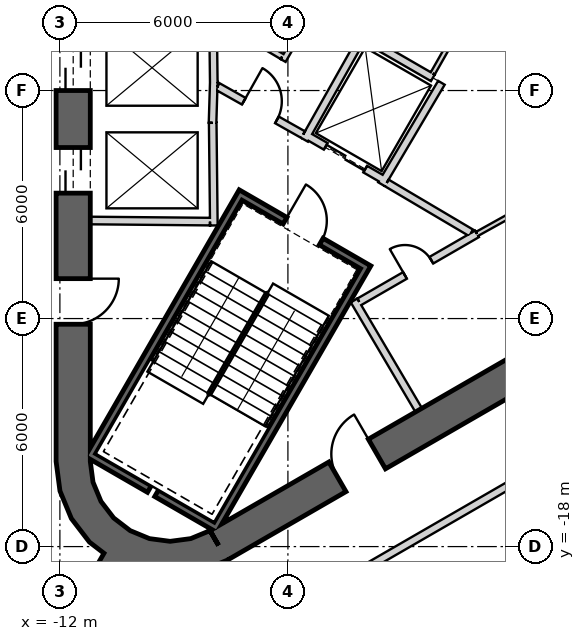
"""IFC4 building model, lengths in metres.
Left out: names, types, materials, properties, quantities, classifications, styles, units other than length and angle.
Written with IfcOpenShell. Run it as: python <this file> out.ifc"""

import sys

from ifc_helpers import new_model, si_unit, direction, frame, frame_2d, origin, place, context, subcontext, project, spatial, polyline, rectangle, outline, extrude, element, fill, save


model = new_model("IFC4")
c1 = context("Model", 3, precision=1e-05, world=origin(), true_north=direction((0.0, 1.0)))
c2 = subcontext(c1, "Body", "Model", "MODEL_VIEW")
j1 = project(units=[si_unit("LENGTHUNIT", "METRE"), si_unit("PLANEANGLEUNIT", "RADIAN")], contexts=[c1])
p1 = place(None, origin())
s1 = spatial("IfcSite", under=j1, at=p1, CompositionType="ELEMENT")
p2 = place(p1, origin())
s2 = spatial("IfcBuilding", under=s1, at=p2, CompositionType="ELEMENT")
p3 = place(p2, frame((0.0, 0.0, 380.6)))
s3 = spatial("IfcBuildingStorey", under=s2, at=p3, CompositionType="ELEMENT", Elevation=380.6)
p4 = place(p3, frame((-11.65, 15.762, 0.0), z_axis=(0.0, 0.0, 1.0), x_axis=(0.0, -1.0, 0.0)))
e1 = element("IfcWall", 1, at=p4, inside=s3, PredefinedType="SHEAR", context=c2, shape_type="SweptSolid", body=[
    extrude(rectangle(XDim=31.523, YDim=0.9, at=frame_2d((15.762, 0.0))), origin(), (0.0, 0.0, 1.0), 3.9),
])
p5 = place(p4, frame((7.062, 0.0, 0.0)))
e2 = element("IfcOpeningElement", 2, at=p5, cuts=e1, PredefinedType="OPENING", context=c2, shape_type="SweptSolid", body=[
    extrude(rectangle(XDim=1.2, YDim=2.4, at=frame_2d((0.6, 1.2))), frame((0.0, 0.46, 0.0), z_axis=(0.0, -1.0, 0.0), x_axis=(1.0, 0.0, 0.0)), (0.0, 0.0, 1.0), 0.92),
])
p6 = place(p4, frame((9.762, 0.0, 0.0)))
e3 = element("IfcOpeningElement", 3, at=p6, cuts=e1, PredefinedType="OPENING", context=c2, shape_type="SweptSolid", body=[
    extrude(rectangle(XDim=1.2, YDim=2.4, at=frame_2d((0.6, 1.2))), frame((0.0, 0.46, 0.0), z_axis=(0.0, -1.0, 0.0), x_axis=(1.0, 0.0, 0.0)), (0.0, 0.0, 1.0), 0.92),
])
p7 = place(p4, frame((12.462, 0.0, 0.0)))
e4 = element("IfcOpeningElement", 4, at=p7, cuts=e1, PredefinedType="OPENING", context=c2, shape_type="SweptSolid", body=[
    extrude(rectangle(XDim=1.2, YDim=2.4, at=frame_2d((0.6, 1.2))), frame((0.0, 0.46, 0.0), z_axis=(0.0, -1.0, 0.0), x_axis=(1.0, 0.0, 0.0)), (0.0, 0.0, 1.0), 0.92),
])
p8 = place(p4, frame((15.162, 0.0, 0.0)))
e5 = element("IfcOpeningElement", 5, at=p8, cuts=e1, PredefinedType="OPENING", context=c2, shape_type="SweptSolid", body=[
    extrude(rectangle(XDim=1.2, YDim=2.4, at=frame_2d((0.6, 1.2))), frame((0.0, 0.46, 0.0), z_axis=(0.0, -1.0, 0.0), x_axis=(1.0, 0.0, 0.0)), (0.0, 0.0, 1.0), 0.92),
])
p9 = place(p4, frame((17.862, 0.0, 0.0)))
e6 = element("IfcOpeningElement", 6, at=p9, cuts=e1, PredefinedType="OPENING", context=c2, shape_type="SweptSolid", body=[
    extrude(rectangle(XDim=1.2, YDim=2.4, at=frame_2d((0.6, 1.2))), frame((0.0, 0.46, 0.0), z_axis=(0.0, -1.0, 0.0), x_axis=(1.0, 0.0, 0.0)), (0.0, 0.0, 1.0), 0.92),
])
p10 = place(p4, frame((20.562, 0.0, 0.0)))
e7 = element("IfcOpeningElement", 7, at=p10, cuts=e1, PredefinedType="OPENING", context=c2, shape_type="SweptSolid", body=[
    extrude(rectangle(XDim=1.2, YDim=2.4, at=frame_2d((0.6, 1.2))), frame((0.0, 0.46, 0.0), z_axis=(0.0, -1.0, 0.0), x_axis=(1.0, 0.0, 0.0)), (0.0, 0.0, 1.0), 0.92),
])
p11 = place(p4, frame((23.262, 0.0, 0.0)))
e8 = element("IfcOpeningElement", 8, at=p11, cuts=e1, PredefinedType="OPENING", context=c2, shape_type="SweptSolid", body=[
    extrude(rectangle(XDim=1.2, YDim=2.4, at=frame_2d((0.6, 1.2))), frame((0.0, 0.46, 0.0), z_axis=(0.0, -1.0, 0.0), x_axis=(1.0, 0.0, 0.0)), (0.0, 0.0, 1.0), 0.92),
])
p12 = place(p4, frame((3.612, 0.0, 0.0)))
e9 = element("IfcOpeningElement", 9, at=p12, cuts=e1, PredefinedType="OPENING", context=c2, shape_type="SweptSolid", body=[
    extrude(rectangle(XDim=1.2, YDim=2.4, at=frame_2d((0.6, 1.2))), frame((0.0, 0.46, 0.0), z_axis=(0.0, -1.0, 0.0), x_axis=(1.0, 0.0, 0.0)), (0.0, 0.0, 1.0), 0.92),
])
p13 = place(p4, frame((26.712, 0.0, 0.0)))
e10 = element("IfcOpeningElement", 10, at=p13, cuts=e1, PredefinedType="OPENING", context=c2, shape_type="SweptSolid", body=[
    extrude(rectangle(XDim=1.2, YDim=2.4, at=frame_2d((0.6, 1.2))), frame((0.0, 0.46, 0.0), z_axis=(0.0, -1.0, 0.0), x_axis=(1.0, 0.0, 0.0)), (0.0, 0.0, 1.0), 0.92),
])
p14 = place(p3, frame((-7.825, -17.97, 0.0), z_axis=(0.0, 0.0, 1.0), x_axis=(0.866028369851, 0.499994862586, 0.0)))
e11 = element("IfcWall", 11, at=p14, inside=s3, PredefinedType="SHEAR", context=c2, shape_type="SweptSolid", body=[
    extrude(rectangle(XDim=31.523, YDim=0.9, at=frame_2d((15.762, 0.0))), origin(), (0.0, 0.0, 1.0), 3.9),
])
p15 = place(p14, frame((17.862, 0.0, 0.0)))
e12 = element("IfcOpeningElement", 12, at=p15, cuts=e11, PredefinedType="OPENING", context=c2, shape_type="SweptSolid", body=[
    extrude(rectangle(XDim=1.2, YDim=2.4, at=frame_2d((0.6, 1.2))), frame((0.0, 0.46, 0.0), z_axis=(0.0, -1.0, 0.0), x_axis=(1.0, 0.0, 0.0)), (0.0, 0.0, 1.0), 0.92),
])
p16 = place(p14, frame((20.562, 0.0, 0.0)))
e13 = element("IfcOpeningElement", 13, at=p16, cuts=e11, PredefinedType="OPENING", context=c2, shape_type="SweptSolid", body=[
    extrude(rectangle(XDim=1.2, YDim=2.4, at=frame_2d((0.6, 1.2))), frame((0.0, 0.46, 0.0), z_axis=(0.0, -1.0, 0.0), x_axis=(1.0, 0.0, 0.0)), (0.0, 0.0, 1.0), 0.92),
])
p17 = place(p14, frame((26.712, 0.0, 0.0)))
e14 = element("IfcOpeningElement", 14, at=p17, cuts=e11, PredefinedType="OPENING", context=c2, shape_type="SweptSolid", body=[
    extrude(rectangle(XDim=1.2, YDim=2.4, at=frame_2d((0.6, 1.2))), frame((0.0, 0.46, 0.0), z_axis=(0.0, -1.0, 0.0), x_axis=(1.0, 0.0, 0.0)), (0.0, 0.0, 1.0), 0.92),
])
p18 = place(p14, frame((3.612, 0.0, 0.0)))
e15 = element("IfcOpeningElement", 15, at=p18, cuts=e11, PredefinedType="OPENING", context=c2, shape_type="SweptSolid", body=[
    extrude(rectangle(XDim=1.2, YDim=2.4, at=frame_2d((0.6, 1.2))), frame((0.0, 0.46, 0.0), z_axis=(0.0, -1.0, 0.0), x_axis=(1.0, 0.0, 0.0)), (0.0, 0.0, 1.0), 0.92),
])
p19 = place(p3, origin())
e16 = element("IfcWall", 16, at=p19, inside=s3, PredefinedType="SHEAR", context=c2, shape_type="SweptSolid", body=[
    extrude(outline(polyline([(-12.1, -15.762), (-11.998, -16.538), (-11.698, -17.262), (-11.221, -17.883), (-10.6, -18.36), (-9.876, -18.659), (-9.1, -18.762), (-8.323, -18.659), (-7.6, -18.36), (-8.05, -17.58), (-8.556, -17.79), (-9.1, -17.862), (-9.644, -17.79), (-10.15, -17.58), (-10.585, -17.247), (-10.919, -16.812), (-11.128, -16.305), (-11.2, -15.762), (-12.1, -15.762)])), origin(), (0.0, 0.0, 1.0), 3.9),
])
p20 = place(p3, frame((-10.575, -18.316, 0.0), z_axis=(0.0, 0.0, 1.0), x_axis=(-0.500011655475, -0.866018674388, 0.0)))
e17 = element("IfcWall", 17, at=p20, inside=s3, PredefinedType="SHEAR", context=c2, shape_type="SweptSolid", body=[
    extrude(rectangle(XDim=6.455, YDim=0.6, at=frame_2d((3.228, 0.0))), origin(), (0.0, 0.0, 1.0), 3.9),
])
p21 = place(p20, frame((2.35, 0.0, 0.0)))
e18 = element("IfcOpeningElement", 18, at=p21, cuts=e17, PredefinedType="OPENING", context=c2, shape_type="SweptSolid", body=[
    extrude(rectangle(XDim=1.4, YDim=2.4, at=frame_2d((0.7, 1.2))), frame((0.0, 0.31, 0.0), z_axis=(0.0, -1.0, 0.0), x_axis=(1.0, 0.0, 0.0)), (0.0, 0.0, 1.0), 0.62),
])
p22 = place(p3, frame((-7.95, -5.772, 0.0), z_axis=(0.0, 0.0, 1.0), x_axis=(-0.030803413295, -0.999525462272, 0.0)))
e19 = element("IfcWall", 19, at=p22, inside=s3, PredefinedType="PLUMBINGWALL", context=c2, shape_type="SweptSolid", body=[
    extrude(rectangle(XDim=1.078, YDim=0.2, at=frame_2d((0.539, 0.0))), origin(), (0.0, 0.0, 1.0), 3.6),
])
p23 = place(p3, frame((-7.98, -4.05, 0.0), z_axis=(0.0, 0.0, 1.0), x_axis=(0.016809909365, -0.999858703491, 0.0)))
e20 = element("IfcWall", 20, at=p23, inside=s3, PredefinedType="PLUMBINGWALL", context=c2, shape_type="SweptSolid", body=[
    extrude(rectangle(XDim=1.844, YDim=0.2, at=frame_2d((0.922, 0.0))), origin(), (0.0, 0.0, 1.0), 3.6),
])
p24 = place(p3, frame((-7.979, -6.85, 0.0), z_axis=(0.0, 0.0, 1.0), x_axis=(0.011121475088, -0.999938154483, 0.0)))
e21 = element("IfcWall", 21, at=p24, inside=s3, PredefinedType="PLUMBINGWALL", context=c2, shape_type="SweptSolid", body=[
    extrude(rectangle(XDim=2.7, YDim=0.2, at=frame_2d((1.35, 0.0))), origin(), (0.0, 0.0, 1.0), 3.6),
])
p25 = place(p3, frame((-8.05, -9.449, 0.0), z_axis=(0.0, 0.0, 1.0), x_axis=(-0.999957467379, 0.009222983926, 0.0)))
e22 = element("IfcWall", 22, at=p25, inside=s3, PredefinedType="PLUMBINGWALL", context=c2, shape_type="SweptSolid", body=[
    extrude(rectangle(XDim=3.15, YDim=0.2, at=frame_2d((1.575, 0.0))), origin(), (0.0, 0.0, 1.0), 3.6),
])
p26 = place(p3, frame((-3.905, -10.563, -0.3), z_axis=(0.0, 0.0, 1.0), x_axis=(-0.500012932018, -0.866017937352, 0.0)))
e23 = element("IfcWall", 23, at=p26, inside=s3, PredefinedType="SHEAR", context=c2, shape_type="SweptSolid", body=[
    extrude(rectangle(XDim=8.1, YDim=0.2, at=frame_2d((4.05, 0.0))), origin(), (0.0, 0.0, 1.0), 3.9),
])
p27 = place(p3, frame((-11.282, -15.541, -0.3), z_axis=(0.0, 0.0, 1.0), x_axis=(0.866000578957, -0.500042995397, 0.0)))
e24 = element("IfcWall", 24, at=p27, inside=s3, PredefinedType="SHEAR", context=c2, shape_type="SweptSolid", body=[
    extrude(rectangle(XDim=1.89, YDim=0.2, at=frame_2d((0.945, 0.0))), origin(), (0.0, 0.0, 1.0), 3.9),
])
p28 = place(p3, frame((-9.455, -16.596, -0.3), z_axis=(0.0, 0.0, 1.0), x_axis=(0.866038843867, -0.499976720371, 0.0)))
e25 = element("IfcWall", 25, at=p28, inside=s3, PredefinedType="SHEAR", context=c2, shape_type="SweptSolid", body=[
    extrude(rectangle(XDim=1.69, YDim=0.2, at=frame_2d((0.845, 0.0))), origin(), (0.0, 0.0, 1.0), 3.9),
])
p29 = place(p3, frame((-7.196, -8.663, -0.3), z_axis=(0.0, 0.0, 1.0), x_axis=(-0.499997992926, -0.866026562566, 0.0)))
e26 = element("IfcWall", 26, at=p29, inside=s3, PredefinedType="SHEAR", context=c2, shape_type="SweptSolid", body=[
    extrude(rectangle(XDim=7.9, YDim=0.2, at=frame_2d((3.95, 0.0))), origin(), (0.0, 0.0, 1.0), 3.9),
])
p30 = place(p3, frame((-4.041, -10.599, -0.3), z_axis=(0.0, 0.0, 1.0), x_axis=(-0.866047807691, 0.499961193289, 0.0)))
e27 = element("IfcWall", 27, at=p30, inside=s3, PredefinedType="SHEAR", context=c2, shape_type="SweptSolid", body=[
    extrude(rectangle(XDim=3.6, YDim=0.2, at=frame_2d((1.8, 0.0))), origin(), (0.0, 0.0, 1.0), 3.9),
])
p31 = place(p30, frame((1.25, 0.0, 0.3)))
e28 = element("IfcOpeningElement", 28, at=p31, cuts=e27, PredefinedType="OPENING", context=c2, shape_type="SweptSolid", body=[
    extrude(rectangle(XDim=1.1, YDim=2.1, at=frame_2d((0.55, 1.05))), frame((0.0, 0.11, 0.0), z_axis=(0.0, -1.0, 0.0), x_axis=(1.0, 0.0, 0.0)), (0.0, 0.0, 1.0), 0.22),
])
p32 = place(p3, frame((-3.446, -8.368, 0.0), z_axis=(0.0, 0.0, 1.0), x_axis=(-0.866024647952, 0.500001309137, 0.0)))
e29 = element("IfcWall", 29, at=p32, inside=s3, PredefinedType="PLUMBINGWALL", context=c2, shape_type="SweptSolid", body=[
    extrude(rectangle(XDim=2.4, YDim=0.2, at=frame_2d((1.2, 0.0))), origin(), (0.0, 0.0, 1.0), 3.6),
])
p33 = place(p32, frame((0.6, 0.0, 0.0)))
e30 = element("IfcOpeningElement", 30, at=p33, cuts=e29, PredefinedType="OPENING", context=c2, shape_type="SweptSolid", body=[
    extrude(rectangle(XDim=1.2, YDim=2.4, at=frame_2d((0.6, 1.2))), frame((0.0, 0.11, 0.0), z_axis=(0.0, -1.0, 0.0), x_axis=(1.0, 0.0, 0.0)), (0.0, 0.0, 1.0), 0.22),
])
p34 = place(p3, frame((-5.562, -7.296, 0.0), z_axis=(0.0, 0.0, 1.0), x_axis=(0.491322718731, 0.870977603649, 0.0)))
e31 = element("IfcWall", 31, at=p34, inside=s3, PredefinedType="PLUMBINGWALL", context=c2, shape_type="SweptSolid", body=[
    extrude(rectangle(XDim=3.1, YDim=0.2, at=frame_2d((1.55, 0.0))), origin(), (0.0, 0.0, 1.0), 3.6),
])
p35 = place(p3, frame((-3.944, -4.651, 0.0), z_axis=(0.0, 0.0, 1.0), x_axis=(0.866008630453, -0.500029051137, 0.0)))
e32 = element("IfcWall", 32, at=p35, inside=s3, PredefinedType="PLUMBINGWALL", context=c2, shape_type="SweptSolid", body=[
    extrude(rectangle(XDim=2.389, YDim=0.2, at=frame_2d((1.195, 0.0))), origin(), (0.0, 0.0, 1.0), 3.6),
])
p36 = place(p3, frame((-2.012, -5.882, 0.0), z_axis=(0.0, 0.0, 1.0), x_axis=(-0.508619639323, -0.860991325447, 0.0)))
e33 = element("IfcWall", 33, at=p36, inside=s3, PredefinedType="PLUMBINGWALL", context=c2, shape_type="SweptSolid", body=[
    extrude(rectangle(XDim=3.0, YDim=0.2, at=frame_2d((1.5, 0.0))), origin(), (0.0, 0.0, 1.0), 3.6),
])
p37 = place(p3, frame((-1.897, -10.275, 0.0), z_axis=(0.0, 0.0, 1.0), x_axis=(0.499984717929, -0.866034226713, 0.0)))
e34 = element("IfcWall", 34, at=p37, inside=s3, PredefinedType="PARTITIONING", context=c2, shape_type="SweptSolid", body=[
    extrude(rectangle(XDim=3.25, YDim=0.12, at=frame_2d((1.625, 0.0))), origin(), (0.0, 0.0, 1.0), 3.6),
])
p38 = place(p3, frame((-4.26, -11.524, 0.0), z_axis=(0.0, 0.0, 1.0), x_axis=(0.507997497166, -0.861358544901, 0.0)))
e35 = element("IfcWall", 35, at=p38, inside=s3, PredefinedType="PARTITIONING", context=c2, shape_type="SweptSolid", body=[
    extrude(rectangle(XDim=3.35, YDim=0.2, at=frame_2d((1.675, 0.0))), origin(), (0.0, 0.0, 1.0), 3.6),
])
p39 = place(p38, frame((1.325, 0.0, 0.0)))
e36 = element("IfcOpeningElement", 36, at=p39, cuts=e35, PredefinedType="OPENING", context=c2, shape_type="SweptSolid", body=[
    extrude(rectangle(XDim=0.8, YDim=2.1, at=frame_2d((0.4, 1.05))), frame((0.0, 0.11, 0.0), z_axis=(0.0, -1.0, 0.0), x_axis=(1.0, 0.0, 0.0)), (0.0, 0.0, 1.0), 0.22),
])
p40 = place(p3, frame((-1.769, -10.237, 0.0), z_axis=(0.0, 0.0, 1.0), x_axis=(-0.871534483978, -0.490334215854, 0.0)))
e37 = element("IfcWall", 37, at=p40, inside=s3, PredefinedType="PARTITIONING", context=c2, shape_type="SweptSolid", body=[
    extrude(rectangle(XDim=2.7, YDim=0.2, at=frame_2d((1.35, 0.0))), origin(), (0.0, 0.0, 1.0), 3.6),
])
p41 = place(p3, frame((-1.024, -9.771, 0.0), z_axis=(0.0, 0.0, 1.0), x_axis=(-0.850348075135, -0.526220629693, 0.0)))
e38 = element("IfcWall", 38, at=p41, inside=s3, PredefinedType="PARTITIONING", context=c2, shape_type="SweptSolid", body=[
    extrude(rectangle(XDim=0.878, YDim=0.2, at=frame_2d((0.439, 0.0))), origin(), (0.0, 0.0, 1.0), 3.6),
])
p42 = place(p3, frame((0.4, -8.949, 0.0), z_axis=(0.0, 0.0, 1.0), x_axis=(-0.866019818373, -0.500009674092, 0.0)))
e39 = element("IfcWall", 39, at=p42, inside=s3, PredefinedType="PARTITIONING", context=c2, shape_type="SweptSolid", body=[
    extrude(rectangle(XDim=1.594, YDim=0.12, at=frame_2d((0.797, 0.0))), origin(), (0.0, 0.0, 1.0), 3.6),
])
p43 = place(p42, frame((0.397, 0.0, 0.0)))
e40 = element("IfcOpeningElement", 40, at=p43, cuts=e39, PredefinedType="OPENING", context=c2, shape_type="SweptSolid", body=[
    extrude(rectangle(XDim=0.8, YDim=2.1, at=frame_2d((0.4, 1.05))), frame((0.0, 0.07, 0.0), z_axis=(0.0, -1.0, 0.0), x_axis=(1.0, 0.0, 0.0)), (0.0, 0.0, 1.0), 0.14),
])
p44 = place(p3, frame((-7.849, -5.894, 0.0), z_axis=(0.0, 0.0, 1.0), x_axis=(0.871340486379, -0.490678873396, 0.0)))
e41 = element("IfcWall", 41, at=p44, inside=s3, PredefinedType="PARTITIONING", context=c2, shape_type="SweptSolid", body=[
    extrude(rectangle(XDim=2.581, YDim=0.2, at=frame_2d((1.291, 0.0))), origin(), (0.0, 0.0, 1.0), 3.6),
])
p45 = place(p3, frame((-3.401, -8.43, 0.0), z_axis=(0.0, 0.0, 1.0), x_axis=(0.860617791406, -0.509251428192, 0.0)))
e42 = element("IfcWall", 42, at=p45, inside=s3, PredefinedType="PARTITIONING", context=c2, shape_type="SweptSolid", body=[
    extrude(rectangle(XDim=2.709, YDim=0.2, at=frame_2d((1.354, 0.0))), origin(), (0.0, 0.0, 1.0), 3.6),
])
p46 = place(p45, frame((0.848, 0.0, 0.0)))
e43 = element("IfcOpeningElement", 43, at=p46, cuts=e42, PredefinedType="OPENING", context=c2, shape_type="SweptSolid", body=[
    extrude(rectangle(XDim=1.0, YDim=2.1, at=frame_2d((0.5, 1.05))), frame((0.0, 0.11, 0.0), z_axis=(0.0, -1.0, 0.0), x_axis=(1.0, 0.0, 0.0)), (0.0, 0.0, 1.0), 0.22),
])
p47 = place(p3, frame((-1.477, -7.808, 0.0), z_axis=(0.0, 0.0, 1.0), x_axis=(0.871829948107, -0.48980867855, 0.0)))
e44 = element("IfcWall", 44, at=p47, inside=s3, PredefinedType="PLUMBINGWALL", context=c2, shape_type="SweptSolid", body=[
    extrude(rectangle(XDim=2.152, YDim=0.15, at=frame_2d((1.076, 0.0))), origin(), (0.0, 0.0, 1.0), 3.6),
])
p48 = place(p3, frame((-0.119, -5.664, 0.0), z_axis=(0.0, 0.0, 1.0), x_axis=(-0.509935662771, -0.860212543406, 0.0)))
e45 = element("IfcWall", 45, at=p48, inside=s3, PredefinedType="PLUMBINGWALL", context=c2, shape_type="SweptSolid", body=[
    extrude(rectangle(XDim=2.46, YDim=0.15, at=frame_2d((1.23, 0.0))), origin(), (0.0, 0.0, 1.0), 3.6),
])
p49 = place(p48, frame((0.83, 0.0, 0.0)))
e46 = element("IfcOpeningElement", 46, at=p49, cuts=e45, PredefinedType="OPENING", context=c2, shape_type="SweptSolid", body=[
    extrude(rectangle(XDim=0.8, YDim=2.1, at=frame_2d((0.4, 1.05))), frame((0.0, 0.085, 0.0), z_axis=(0.0, -1.0, 0.0), x_axis=(1.0, 0.0, 0.0)), (0.0, 0.0, 1.0), 0.17),
])
p50 = place(p3, frame((-1.436, -4.367, 0.0), z_axis=(0.0, 0.0, 1.0), x_axis=(0.866087547558, -0.499892348375, 0.0)))
e47 = element("IfcWall", 47, at=p50, inside=s3, PredefinedType="PARTITIONING", context=c2, shape_type="SweptSolid", body=[
    extrude(rectangle(XDim=1.7, YDim=0.12, at=frame_2d((0.85, 0.0))), origin(), (0.0, 0.0, 1.0), 3.6),
])
p51 = place(p3, frame((-7.061, -20.358, 0.0), z_axis=(0.0, 0.0, 1.0), x_axis=(0.866024332115, 0.500001856182, 0.0)))
e48 = element("IfcWall", 48, at=p51, inside=s3, PredefinedType="PARTITIONING", context=c2, shape_type="SweptSolid", body=[
    extrude(rectangle(XDim=8.925, YDim=0.2, at=frame_2d((4.463, 0.0))), origin(), (0.0, 0.0, 1.0), 2.97),
])
p52 = place(p51, frame((4.1, 0.0, 0.0)))
e49 = element("IfcOpeningElement", 49, at=p52, cuts=e48, PredefinedType="OPENING", context=c2, shape_type="SweptSolid", body=[
    extrude(rectangle(XDim=1.0, YDim=2.1, at=frame_2d((0.5, 1.05))), frame((0.0, 0.11, 0.0), z_axis=(0.0, -1.0, 0.0), x_axis=(1.0, 0.0, 0.0)), (0.0, 0.0, 1.0), 0.22),
])
p53 = place(p31, origin())
e50 = element("IfcDoor", 50, at=p53, inside=s3, OperationType="SINGLE_SWING_RIGHT", PredefinedType="USERDEFINED", context=c2, shape_type="SweptSolid", body=[
    extrude(rectangle(XDim=1.1, YDim=2.1, at=frame_2d((0.55, 1.05))), frame((0.0, 0.025, 0.0), z_axis=(0.0, -1.0, 0.0), x_axis=(1.0, 0.0, 0.0)), (0.0, 0.0, 1.0), 0.05),
])
fill(e28, e50)
p54 = place(p46, origin())
e51 = element("IfcDoor", 51, at=p54, inside=s3, OperationType="SINGLE_SWING_RIGHT", PredefinedType="USERDEFINED", context=c2, shape_type="SweptSolid", body=[
    extrude(rectangle(XDim=1.0, YDim=2.1, at=frame_2d((0.5, 1.05))), frame((0.0, 0.025, 0.0), z_axis=(0.0, -1.0, 0.0), x_axis=(1.0, 0.0, 0.0)), (0.0, 0.0, 1.0), 0.05),
])
fill(e43, e51)
p55 = place(p33, origin())
e52 = element("IfcDoor", 52, at=p55, inside=s3, OperationType="SLIDING_TO_LEFT", PredefinedType="USERDEFINED", context=c2, shape_type="SweptSolid", body=[
    extrude(rectangle(XDim=1.2, YDim=2.4, at=frame_2d((0.6, 1.2))), frame((0.0, 0.025, 0.0), z_axis=(0.0, -1.0, 0.0), x_axis=(1.0, 0.0, 0.0)), (0.0, 0.0, 1.0), 0.05),
])
fill(e30, e52)
p56 = place(p49, origin())
e53 = element("IfcDoor", 53, at=p56, inside=s3, OperationType="SINGLE_SWING_LEFT", PredefinedType="USERDEFINED", context=c2, shape_type="SweptSolid", body=[
    extrude(rectangle(XDim=0.8, YDim=2.1, at=frame_2d((0.4, 1.05))), frame((0.0, 0.025, 0.0), z_axis=(0.0, -1.0, 0.0), x_axis=(1.0, 0.0, 0.0)), (0.0, 0.0, 1.0), 0.05),
])
fill(e46, e53)
p57 = place(p39, origin())
e54 = element("IfcDoor", 54, at=p57, inside=s3, OperationType="SINGLE_SWING_LEFT", PredefinedType="USERDEFINED", context=c2, shape_type="SweptSolid", body=[
    extrude(rectangle(XDim=0.8, YDim=2.1, at=frame_2d((0.4, 1.05))), frame((0.0, 0.025, 0.0), z_axis=(0.0, -1.0, 0.0), x_axis=(1.0, 0.0, 0.0)), (0.0, 0.0, 1.0), 0.05),
])
fill(e36, e54)
p58 = place(p43, origin())
e55 = element("IfcDoor", 55, at=p58, inside=s3, OperationType="SINGLE_SWING_RIGHT", PredefinedType="USERDEFINED", context=c2, shape_type="SweptSolid", body=[
    extrude(rectangle(XDim=0.8, YDim=2.1, at=frame_2d((0.4, 1.05))), frame((0.0, 0.025, 0.0), z_axis=(0.0, -1.0, 0.0), x_axis=(1.0, 0.0, 0.0)), (0.0, 0.0, 1.0), 0.05),
])
fill(e40, e55)
p59 = place(p52, origin())
e56 = element("IfcDoor", 56, at=p59, inside=s3, OperationType="SINGLE_SWING_RIGHT", PredefinedType="USERDEFINED", context=c2, shape_type="SweptSolid", body=[
    extrude(rectangle(XDim=1.0, YDim=2.1, at=frame_2d((0.5, 1.05))), frame((0.0, 0.025, 0.0), z_axis=(0.0, -1.0, 0.0), x_axis=(1.0, 0.0, 0.0)), (0.0, 0.0, 1.0), 0.05),
])
fill(e49, e56)
p60 = place(p10, origin())
e57 = element("IfcDoor", 57, at=p60, inside=s3, OperationType="SLIDING_TO_LEFT", PredefinedType="USERDEFINED", context=c2, shape_type="SweptSolid", body=[
    extrude(rectangle(XDim=1.2, YDim=2.4, at=frame_2d((0.6, 1.2))), frame((0.0, 0.025, 0.0), z_axis=(0.0, -1.0, 0.0), x_axis=(1.0, 0.0, 0.0)), (0.0, 0.0, 1.0), 0.05),
])
fill(e7, e57)
p61 = place(p11, origin())
e58 = element("IfcDoor", 58, at=p61, inside=s3, OperationType="SLIDING_TO_LEFT", PredefinedType="USERDEFINED", context=c2, shape_type="SweptSolid", body=[
    extrude(rectangle(XDim=1.2, YDim=2.4, at=frame_2d((0.6, 1.2))), frame((0.0, 0.025, 0.0), z_axis=(0.0, -1.0, 0.0), x_axis=(1.0, 0.0, 0.0)), (0.0, 0.0, 1.0), 0.05),
])
fill(e8, e58)
p62 = place(p13, origin())
e59 = element("IfcDoor", 59, at=p62, inside=s3, OperationType="SINGLE_SWING_LEFT", PredefinedType="USERDEFINED", context=c2, shape_type="SweptSolid", body=[
    extrude(rectangle(XDim=1.2, YDim=2.4, at=frame_2d((0.6, 1.2))), frame((0.0, 0.025, 0.0), z_axis=(0.0, -1.0, 0.0), x_axis=(1.0, 0.0, 0.0)), (0.0, 0.0, 1.0), 0.05),
])
fill(e10, e59)
p63 = place(p18, origin())
e60 = element("IfcDoor", 60, at=p63, inside=s3, OperationType="SINGLE_SWING_RIGHT", PredefinedType="USERDEFINED", context=c2, shape_type="SweptSolid", body=[
    extrude(rectangle(XDim=1.2, YDim=2.4, at=frame_2d((0.6, 1.2))), frame((0.0, 0.025, 0.0), z_axis=(0.0, -1.0, 0.0), x_axis=(1.0, 0.0, 0.0)), (0.0, 0.0, 1.0), 0.05),
])
fill(e15, e60)
save(model, sys.argv[1])
